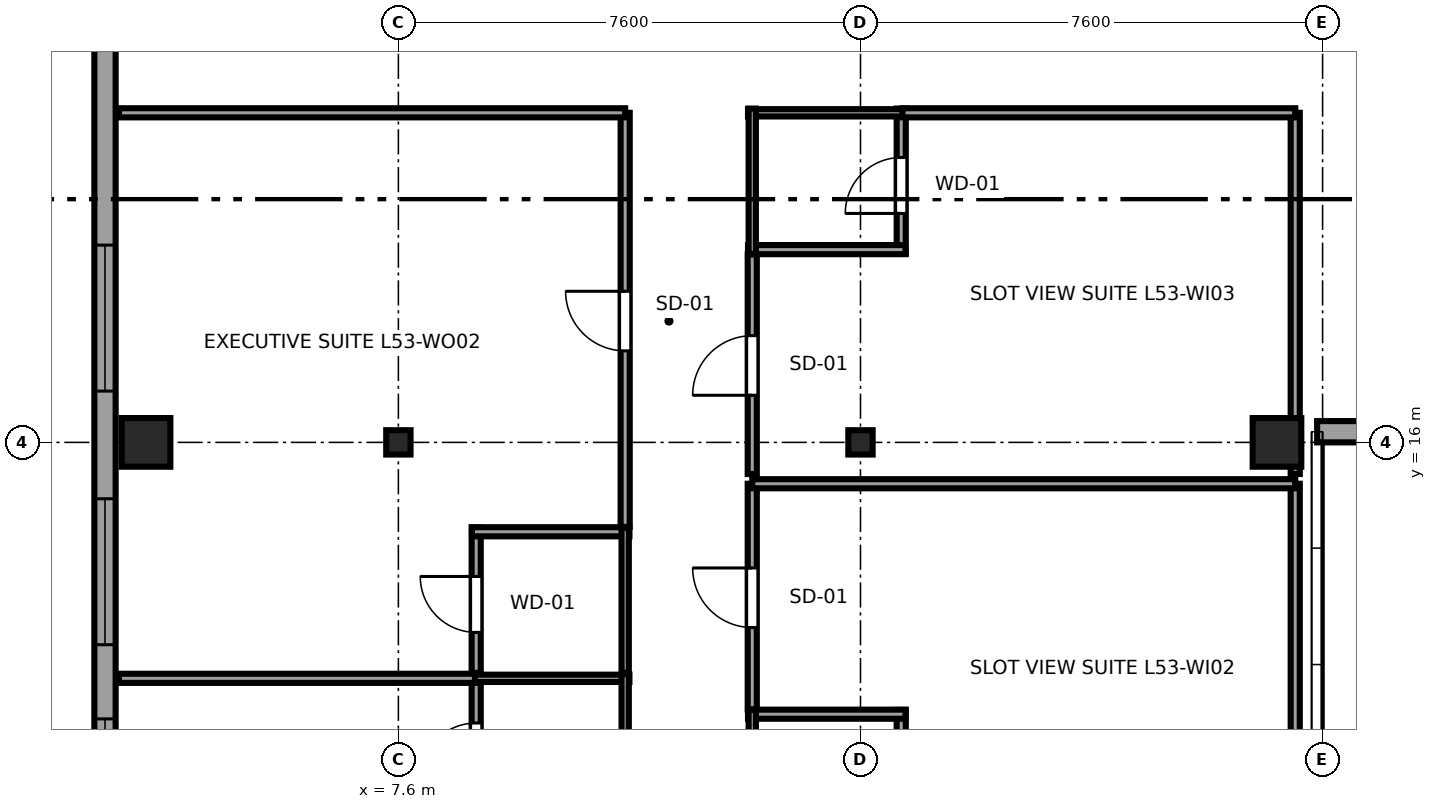
"""IFC4 building model, lengths in metres.
Left out: names, types, materials, properties, quantities, classifications, styles, units other than length and angle.
Written with IfcOpenShell. Run it as: python <this file> out.ifc"""

import sys

from ifc_helpers import new_model, si_unit, direction, frame, frame_2d, origin, origin_2d, place, context, subcontext, project, spatial, rectangle, i_section, extrude, source, transform, mapped, element, fill, save


model = new_model("IFC4")
c1 = context("Model", 3, precision=1e-05, world=origin(), true_north=direction((0.0, 1.0)))
c2 = subcontext(c1, "Body", "Model", "MODEL_VIEW")
j1 = project(units=[si_unit("LENGTHUNIT", "METRE"), si_unit("PLANEANGLEUNIT", "RADIAN")], contexts=[c1])
p1 = place(None, origin())
s1 = spatial("IfcSite", under=j1, at=p1, CompositionType="ELEMENT")
p2 = place(p1, origin())
s2 = spatial("IfcBuilding", under=s1, at=p2, CompositionType="ELEMENT")
p3 = place(p2, frame((0.0, 0.0, 201.75)))
s3 = spatial("IfcBuildingStorey", under=s2, at=p3, CompositionType="ELEMENT", Elevation=201.75)
m1 = source(origin(), c2, "Body", "SweptSolid", [
    extrude(rectangle(XDim=0.8, YDim=0.8, at=origin_2d()), origin(), (0.0, 0.0, 1.0), 3.55),
])
p4 = place(p3, frame((3.45, 16.0, 0.0), z_axis=(0.0, 0.0, 1.0), x_axis=(1.0, 0.0, 0.0)))
e1 = element("IfcColumn", 1, at=p4, inside=s3, PredefinedType="COLUMN", context=c2, shape_type="MappedRepresentation", body=[
    mapped(m1, transform((0.0, 0.0, 0.0), x_axis=(1.0, 0.0, 0.0), y_axis=(0.0, 1.0, 0.0), z_axis=(0.0, 0.0, 1.0), scale=1.0)),
])
m2 = source(origin(), c2, "Body", "SweptSolid", [
    extrude(i_section(OverallWidth=0.4, OverallDepth=0.4, WebThickness=0.02, FlangeThickness=0.035, at=origin_2d()), origin(), (0.0, 0.0, 1.0), 3.55),
])
for number, where, z_axis, x_axis in (
    (2, (7.6, 16.0, 0.0), (0.0, 0.0, 1.0), (1.0, 0.0, 0.0)),
    (3, (15.2, 16.0, 0.0), (0.0, 0.0, 1.0), (1.0, 0.0, 0.0)),
):
    element("IfcColumn", number, at=place(p3, frame(where, z_axis=z_axis, x_axis=x_axis)), inside=s3, PredefinedType="COLUMN", context=c2, shape_type="MappedRepresentation", body=[
        mapped(m2, transform((0.0, 0.0, 0.0), x_axis=(1.0, 0.0, 0.0), y_axis=(0.0, 1.0, 0.0), z_axis=(0.0, 0.0, 1.0), scale=1.0)),
    ])
p5 = place(p3, frame((22.05, 16.0, 0.0), z_axis=(0.0, 0.0, 1.0), x_axis=(1.0, 0.0, 0.0)))
e4 = element("IfcColumn", 4, at=p5, inside=s3, PredefinedType="COLUMN", context=c2, shape_type="MappedRepresentation", body=[
    mapped(m1, transform((0.0, 0.0, 0.0), x_axis=(1.0, 0.0, 0.0), y_axis=(0.0, 1.0, 0.0), z_axis=(0.0, 0.0, 1.0), scale=1.0)),
])
p6 = place(p3, frame((22.71, 16.175, 0.0), z_axis=(0.0, 0.0, 1.0), x_axis=(1.0, 0.0, 0.0)))
e5 = element("IfcWall", 5, at=p6, inside=s3, PredefinedType="SOLIDWALL", context=c2, shape_type="SweptSolid", body=[
    extrude(rectangle(XDim=11.58, YDim=0.35, at=frame_2d((5.79, 0.0))), origin(), (0.0, 0.0, 1.0), 2.08),
])
p7 = place(p3, frame((2.775, 41.583, 0.0), z_axis=(0.0, 0.0, 1.0), x_axis=(0.0, -1.0, 0.0)))
e6 = element("IfcWall", 6, at=p7, inside=s3, PredefinedType="SOLIDWALL", context=c2, shape_type="SweptSolid", body=[
    extrude(rectangle(XDim=34.566, YDim=0.35, at=frame_2d((17.283, 0.0))), origin(), (0.0, 0.0, 1.0), 3.29),
])
p8 = place(p7, frame((10.877, 0.0, 0.68)))
e7 = element("IfcOpeningElement", 7, at=p8, cuts=e6, PredefinedType="OPENING", context=c2, shape_type="SweptSolid", body=[
    extrude(rectangle(XDim=2.4, YDim=1.9, at=frame_2d((1.2, 0.95))), frame((0.0, 0.185, 0.0), z_axis=(0.0, -1.0, 0.0), x_axis=(1.0, 0.0, 0.0)), (0.0, 0.0, 1.0), 0.37),
])
p9 = place(p7, frame((13.997, 0.0, 0.68)))
e8 = element("IfcOpeningElement", 8, at=p9, cuts=e6, PredefinedType="OPENING", context=c2, shape_type="SweptSolid", body=[
    extrude(rectangle(XDim=2.4, YDim=1.9, at=frame_2d((1.2, 0.95))), frame((0.0, 0.185, 0.0), z_axis=(0.0, -1.0, 0.0), x_axis=(1.0, 0.0, 0.0)), (0.0, 0.0, 1.0), 0.37),
])
p10 = place(p7, frame((22.339, 0.0, 0.68)))
e9 = element("IfcOpeningElement", 9, at=p10, cuts=e6, PredefinedType="OPENING", context=c2, shape_type="SweptSolid", body=[
    extrude(rectangle(XDim=2.4, YDim=1.9, at=frame_2d((1.2, 0.95))), frame((0.0, 0.185, 0.0), z_axis=(0.0, -1.0, 0.0), x_axis=(1.0, 0.0, 0.0)), (0.0, 0.0, 1.0), 0.37),
])
p11 = place(p7, frame((26.51, 0.0, 0.68)))
e10 = element("IfcOpeningElement", 10, at=p11, cuts=e6, PredefinedType="OPENING", context=c2, shape_type="SweptSolid", body=[
    extrude(rectangle(XDim=2.4, YDim=1.9, at=frame_2d((1.2, 0.95))), frame((0.0, 0.185, 0.0), z_axis=(0.0, -1.0, 0.0), x_axis=(1.0, 0.0, 0.0)), (0.0, 0.0, 1.0), 0.37),
])
p12 = place(p7, frame((30.13, 0.0, 0.68)))
e11 = element("IfcOpeningElement", 11, at=p12, cuts=e6, PredefinedType="OPENING", context=c2, shape_type="SweptSolid", body=[
    extrude(rectangle(XDim=2.4, YDim=1.9, at=frame_2d((1.2, 0.95))), frame((0.0, 0.185, 0.0), z_axis=(0.0, -1.0, 0.0), x_axis=(1.0, 0.0, 0.0)), (0.0, 0.0, 1.0), 0.37),
])
p13 = place(p7, frame((6.033, 0.0, 0.62)))
e12 = element("IfcOpeningElement", 12, at=p13, cuts=e6, PredefinedType="OPENING", context=c2, shape_type="SweptSolid", body=[
    extrude(rectangle(XDim=1.5, YDim=1.55, at=frame_2d((0.75, 0.775))), frame((0.0, 0.185, 0.0), z_axis=(0.0, -1.0, 0.0), x_axis=(1.0, 0.0, 0.0)), (0.0, 0.0, 1.0), 0.37),
])
p14 = place(p3, frame((8.88, 9.8, 0.0), z_axis=(0.0, 0.0, 1.0), x_axis=(0.0, 1.0, 0.0)))
e13 = element("IfcWall", 13, at=p14, inside=s3, PredefinedType="PARTITIONING", context=c2, shape_type="SweptSolid", body=[
    extrude(rectangle(XDim=2.39, YDim=0.15, at=frame_2d((1.195, 0.0))), origin(), (0.0, 0.0, 1.0), 3.29),
])
p15 = place(p14, frame((0.665, 0.0, 0.0)))
e14 = element("IfcOpeningElement", 14, at=p15, cuts=e13, PredefinedType="OPENING", context=c2, shape_type="SweptSolid", body=[
    extrude(rectangle(XDim=0.92, YDim=2.01, at=frame_2d((0.46, 1.005))), frame((0.0, 0.085, 0.0), z_axis=(0.0, -1.0, 0.0), x_axis=(1.0, 0.0, 0.0)), (0.0, 0.0, 1.0), 0.17),
])
p16 = place(p3, frame((8.81, 12.12, 0.0), z_axis=(0.0, 0.0, 1.0), x_axis=(1.0, 0.0, 0.0)))
e15 = element("IfcWall", 15, at=p16, inside=s3, PredefinedType="PLUMBINGWALL", context=c2, shape_type="SweptSolid", body=[
    extrude(rectangle(XDim=2.59, YDim=0.12, at=frame_2d((1.295, 0.0))), origin(), (0.0, 0.0, 1.0), 3.29),
])
p17 = place(p3, frame((11.33, 9.8, 0.0), z_axis=(0.0, 0.0, 1.0), x_axis=(0.0, 1.0, 0.0)))
e16 = element("IfcWall", 16, at=p17, inside=s3, PredefinedType="PLUMBINGWALL", context=c2, shape_type="SweptSolid", body=[
    extrude(rectangle(XDim=2.39, YDim=0.12, at=frame_2d((1.195, 0.0))), origin(), (0.0, 0.0, 1.0), 2.921),
])
p18 = place(p3, frame((8.88, 12.21, 0.0), z_axis=(0.0, 0.0, 1.0), x_axis=(0.0, 1.0, 0.0)))
e17 = element("IfcWall", 17, at=p18, inside=s3, PredefinedType="PARTITIONING", context=c2, shape_type="SweptSolid", body=[
    extrude(rectangle(XDim=2.39, YDim=0.15, at=frame_2d((1.195, 0.0))), origin(), (0.0, 0.0, 1.0), 3.29),
])
p19 = place(p18, frame((0.665, 0.0, 0.0)))
e18 = element("IfcOpeningElement", 18, at=p19, cuts=e17, PredefinedType="OPENING", context=c2, shape_type="SweptSolid", body=[
    extrude(rectangle(XDim=0.92, YDim=2.01, at=frame_2d((0.46, 1.005))), frame((0.0, 0.085, 0.0), z_axis=(0.0, -1.0, 0.0), x_axis=(1.0, 0.0, 0.0)), (0.0, 0.0, 1.0), 0.17),
])
p20 = place(p3, frame((8.81, 14.53, 0.0), z_axis=(0.0, 0.0, 1.0), x_axis=(1.0, 0.0, 0.0)))
e19 = element("IfcWall", 19, at=p20, inside=s3, PredefinedType="PARTITIONING", context=c2, shape_type="SweptSolid", body=[
    extrude(rectangle(XDim=2.59, YDim=0.15, at=frame_2d((1.295, 0.0))), origin(), (0.0, 0.0, 1.0), 3.29),
])
p21 = place(p3, frame((11.33, 12.21, 0.0), z_axis=(0.0, 0.0, 1.0), x_axis=(0.0, 1.0, 0.0)))
e20 = element("IfcWall", 20, at=p21, inside=s3, PredefinedType="PLUMBINGWALL", context=c2, shape_type="SweptSolid", body=[
    extrude(rectangle(XDim=2.39, YDim=0.12, at=frame_2d((1.195, 0.0))), origin(), (0.0, 0.0, 1.0), 2.921),
])
p22 = place(p3, frame((15.87, 9.21, 0.0), z_axis=(0.0, 0.0, 1.0), x_axis=(0.0, 1.0, 0.0)))
e21 = element("IfcWall", 21, at=p22, inside=s3, PredefinedType="PARTITIONING", context=c2, shape_type="SweptSolid", body=[
    extrude(rectangle(XDim=2.39, YDim=0.15, at=frame_2d((1.195, 0.0))), origin(), (0.0, 0.0, 1.0), 3.29),
])
p23 = place(p22, frame((0.665, 0.0, 0.0)))
e22 = element("IfcOpeningElement", 22, at=p23, cuts=e21, PredefinedType="OPENING", context=c2, shape_type="SweptSolid", body=[
    extrude(rectangle(XDim=0.92, YDim=2.01, at=frame_2d((0.46, 1.005))), frame((0.0, 0.085, 0.0), z_axis=(0.0, -1.0, 0.0), x_axis=(1.0, 0.0, 0.0)), (0.0, 0.0, 1.0), 0.17),
])
p24 = place(p3, frame((13.35, 11.53, 0.0), z_axis=(0.0, 0.0, 1.0), x_axis=(1.0, 0.0, 0.0)))
e23 = element("IfcWall", 23, at=p24, inside=s3, PredefinedType="PARTITIONING", context=c2, shape_type="SweptSolid", body=[
    extrude(rectangle(XDim=2.59, YDim=0.15, at=frame_2d((1.295, 0.0))), origin(), (0.0, 0.0, 1.0), 3.29),
])
p25 = place(p3, frame((13.42, 9.21, 0.0), z_axis=(0.0, 0.0, 1.0), x_axis=(0.0, 1.0, 0.0)))
e24 = element("IfcWall", 24, at=p25, inside=s3, PredefinedType="PLUMBINGWALL", context=c2, shape_type="SweptSolid", body=[
    extrude(rectangle(XDim=2.39, YDim=0.12, at=frame_2d((1.195, 0.0))), origin(), (0.0, 0.0, 1.0), 3.29),
])
p26 = place(p3, frame((15.87, 19.1, 0.0), z_axis=(0.0, 0.0, 1.0), x_axis=(0.0, 1.0, 0.0)))
e25 = element("IfcWall", 25, at=p26, inside=s3, PredefinedType="PARTITIONING", context=c2, shape_type="SweptSolid", body=[
    extrude(rectangle(XDim=2.39, YDim=0.15, at=frame_2d((1.195, 0.0))), origin(), (0.0, 0.0, 1.0), 3.29),
])
p27 = place(p26, frame((0.665, 0.0, 0.0)))
e26 = element("IfcOpeningElement", 26, at=p27, cuts=e25, PredefinedType="OPENING", context=c2, shape_type="SweptSolid", body=[
    extrude(rectangle(XDim=0.92, YDim=2.01, at=frame_2d((0.46, 1.005))), frame((0.0, 0.085, 0.0), z_axis=(0.0, -1.0, 0.0), x_axis=(1.0, 0.0, 0.0)), (0.0, 0.0, 1.0), 0.17),
])
p28 = place(p3, frame((13.35, 19.17, 0.0), z_axis=(0.0, 0.0, 1.0), x_axis=(1.0, 0.0, 0.0)))
e27 = element("IfcWall", 27, at=p28, inside=s3, PredefinedType="PARTITIONING", context=c2, shape_type="SweptSolid", body=[
    extrude(rectangle(XDim=2.59, YDim=0.15, at=frame_2d((1.295, 0.0))), origin(), (0.0, 0.0, 1.0), 3.29),
])
p29 = place(p3, frame((13.35, 21.42, 0.0), z_axis=(0.0, 0.0, 1.0), x_axis=(1.0, 0.0, 0.0)))
e28 = element("IfcWall", 28, at=p29, inside=s3, PredefinedType="PLUMBINGWALL", context=c2, shape_type="SweptSolid", body=[
    extrude(rectangle(XDim=2.59, YDim=0.12, at=frame_2d((1.295, 0.0))), origin(), (0.0, 0.0, 1.0), 3.29),
])
p30 = place(p3, frame((13.42, 19.1, 0.0), z_axis=(0.0, 0.0, 1.0), x_axis=(0.0, 1.0, 0.0)))
e29 = element("IfcWall", 29, at=p30, inside=s3, PredefinedType="PLUMBINGWALL", context=c2, shape_type="SweptSolid", body=[
    extrude(rectangle(XDim=2.39, YDim=0.12, at=frame_2d((1.195, 0.0))), origin(), (0.0, 0.0, 1.0), 3.29),
])
p31 = place(p3, frame((3.005, 12.12, 0.0), z_axis=(0.0, 0.0, 1.0), x_axis=(1.0, 0.0, 0.0)))
e30 = element("IfcWall", 30, at=p31, inside=s3, PredefinedType="PARTITIONING", context=c2, shape_type="SweptSolid", body=[
    extrude(rectangle(XDim=5.855, YDim=0.15, at=frame_2d((2.928, 0.0))), origin(), (0.0, 0.0, 1.0), 3.29),
])
p32 = place(p3, frame((11.33, 14.61, 0.0), z_axis=(0.0, 0.0, 1.0), x_axis=(0.0, 1.0, 0.0)))
e31 = element("IfcWall", 31, at=p32, inside=s3, PredefinedType="PARTITIONING", context=c2, shape_type="SweptSolid", body=[
    extrude(rectangle(XDim=6.81, YDim=0.15, at=frame_2d((3.405, 0.0))), origin(), (0.0, 0.0, 1.0), 2.921),
])
p33 = place(p32, frame((2.895, 0.0, 0.0)))
e32 = element("IfcOpeningElement", 32, at=p33, cuts=e31, PredefinedType="OPENING", context=c2, shape_type="SweptSolid", body=[
    extrude(rectangle(XDim=0.98, YDim=2.12, at=frame_2d((0.49, 1.06))), frame((0.0, 0.085, 0.0), z_axis=(0.0, -1.0, 0.0), x_axis=(1.0, 0.0, 0.0)), (0.0, 0.0, 1.0), 0.17),
])
p34 = place(p3, frame((3.005, 21.42, 0.0), z_axis=(0.0, 0.0, 1.0), x_axis=(1.0, 0.0, 0.0)))
e33 = element("IfcWall", 33, at=p34, inside=s3, PredefinedType="PARTITIONING", context=c2, shape_type="SweptSolid", body=[
    extrude(rectangle(XDim=8.325, YDim=0.15, at=frame_2d((4.163, 0.0))), origin(), (0.0, 0.0, 1.0), 3.29),
])
p35 = place(p3, frame((13.42, 11.61, 0.0), z_axis=(0.0, 0.0, 1.0), x_axis=(0.0, 1.0, 0.0)))
e34 = element("IfcWall", 34, at=p35, inside=s3, PredefinedType="PARTITIONING", context=c2, shape_type="SweptSolid", body=[
    extrude(rectangle(XDim=3.71, YDim=0.15, at=frame_2d((1.855, 0.0))), origin(), (0.0, 0.0, 1.0), 3.29),
])
p36 = place(p35, frame((1.345, 0.0, 0.0)))
e35 = element("IfcOpeningElement", 35, at=p36, cuts=e34, PredefinedType="OPENING", context=c2, shape_type="SweptSolid", body=[
    extrude(rectangle(XDim=0.98, YDim=2.12, at=frame_2d((0.49, 1.06))), frame((0.0, 0.085, 0.0), z_axis=(0.0, -1.0, 0.0), x_axis=(1.0, 0.0, 0.0)), (0.0, 0.0, 1.0), 0.17),
])
p37 = place(p3, frame((22.35, 9.28, 0.0), z_axis=(0.0, 0.0, 1.0), x_axis=(0.0, 1.0, 0.0)))
e36 = element("IfcWall", 36, at=p37, inside=s3, PredefinedType="PARTITIONING", context=c2, shape_type="SweptSolid", body=[
    extrude(rectangle(XDim=6.04, YDim=0.15, at=frame_2d((3.02, 0.0))), origin(), (0.0, 0.0, 1.0), 2.08),
])
p38 = place(p3, frame((13.42, 15.32, 0.0), z_axis=(0.0, 0.0, 1.0), x_axis=(1.0, 0.0, 0.0)))
e37 = element("IfcWall", 37, at=p38, inside=s3, PredefinedType="PARTITIONING", context=c2, shape_type="SweptSolid", body=[
    extrude(rectangle(XDim=8.93, YDim=0.15, at=frame_2d((4.465, 0.0))), origin(), (0.0, 0.0, 1.0), 3.29),
])
p39 = place(p3, frame((13.42, 15.48, 0.0), z_axis=(0.0, 0.0, 1.0), x_axis=(0.0, 1.0, 0.0)))
e38 = element("IfcWall", 38, at=p39, inside=s3, PredefinedType="PARTITIONING", context=c2, shape_type="SweptSolid", body=[
    extrude(rectangle(XDim=3.61, YDim=0.15, at=frame_2d((1.805, 0.0))), origin(), (0.0, 0.0, 1.0), 3.29),
])
p40 = place(p39, frame((1.295, 0.0, 0.0)))
e39 = element("IfcOpeningElement", 39, at=p40, cuts=e38, PredefinedType="OPENING", context=c2, shape_type="SweptSolid", body=[
    extrude(rectangle(XDim=0.98, YDim=2.12, at=frame_2d((0.49, 1.06))), frame((0.0, 0.085, 0.0), z_axis=(0.0, -1.0, 0.0), x_axis=(1.0, 0.0, 0.0)), (0.0, 0.0, 1.0), 0.17),
])
p41 = place(p3, frame((22.35, 15.48, 0.0), z_axis=(0.0, 0.0, 1.0), x_axis=(0.0, 1.0, 0.0)))
e40 = element("IfcWall", 40, at=p41, inside=s3, PredefinedType="PARTITIONING", context=c2, shape_type="SweptSolid", body=[
    extrude(rectangle(XDim=5.94, YDim=0.15, at=frame_2d((2.97, 0.0))), origin(), (0.0, 0.0, 1.0), 2.08),
])
p42 = place(p3, frame((15.89, 21.42, 0.0), z_axis=(0.0, 0.0, 1.0), x_axis=(1.0, 0.0, 0.0)))
e41 = element("IfcWall", 41, at=p42, inside=s3, PredefinedType="PARTITIONING", context=c2, shape_type="SweptSolid", body=[
    extrude(rectangle(XDim=6.46, YDim=0.15, at=frame_2d((3.23, 0.0))), origin(), (0.0, 0.0, 1.0), 3.29),
])
m3 = source(origin(), c2, "Body", "SweptSolid", [
    extrude(rectangle(XDim=2.4, YDim=1.9, at=frame_2d((1.2, 0.95))), frame((0.0, 0.09, 0.0), z_axis=(0.0, -1.0, 0.0), x_axis=(1.0, 0.0, 0.0)), (0.0, 0.0, 1.0), 0.06),
])
p43 = place(p10, origin())
e42 = element("IfcWindow", 42, at=p43, inside=s3, PartitioningType="TRIPLE_PANEL_HORIZONTAL", PredefinedType="WINDOW", context=c2, shape_type="MappedRepresentation", body=[
    mapped(m3, transform((0.0, 0.0, 0.0), x_axis=(1.0, 0.0, 0.0), y_axis=(0.0, 1.0, 0.0), z_axis=(0.0, 0.0, 1.0), scale=1.0)),
])
fill(e9, e42)
p44 = place(p11, origin())
e43 = element("IfcWindow", 43, at=p44, inside=s3, PartitioningType="TRIPLE_PANEL_HORIZONTAL", PredefinedType="WINDOW", context=c2, shape_type="MappedRepresentation", body=[
    mapped(m3, transform((0.0, 0.0, 0.0), x_axis=(1.0, 0.0, 0.0), y_axis=(0.0, 1.0, 0.0), z_axis=(0.0, 0.0, 1.0), scale=1.0)),
])
fill(e10, e43)
p45 = place(p12, origin())
e44 = element("IfcWindow", 44, at=p45, inside=s3, PartitioningType="TRIPLE_PANEL_HORIZONTAL", PredefinedType="WINDOW", context=c2, shape_type="MappedRepresentation", body=[
    mapped(m3, transform((0.0, 0.0, 0.0), x_axis=(1.0, 0.0, 0.0), y_axis=(0.0, 1.0, 0.0), z_axis=(0.0, 0.0, 1.0), scale=1.0)),
])
fill(e11, e44)
m4 = source(origin(), c2, "Body", "SweptSolid", [
    extrude(rectangle(XDim=0.92, YDim=2.01, at=frame_2d((0.46, 1.005))), frame((0.0, 0.025, 0.0), z_axis=(0.0, -1.0, 0.0), x_axis=(1.0, 0.0, 0.0)), (0.0, 0.0, 1.0), 0.05),
])
p46 = place(p15, origin())
e45 = element("IfcDoor", 45, at=p46, inside=s3, OperationType="SINGLE_SWING_LEFT", PredefinedType="DOOR", context=c2, shape_type="MappedRepresentation", body=[
    mapped(m4, transform((0.0, 0.0, 0.0), x_axis=(1.0, 0.0, 0.0), y_axis=(0.0, 1.0, 0.0), z_axis=(0.0, 0.0, 1.0), scale=1.0)),
])
fill(e14, e45)
p47 = place(p19, origin())
e46 = element("IfcDoor", 46, at=p47, inside=s3, OperationType="SINGLE_SWING_RIGHT", PredefinedType="DOOR", context=c2, shape_type="MappedRepresentation", body=[
    mapped(m4, transform((0.0, 0.0, 0.0), x_axis=(1.0, 0.0, 0.0), y_axis=(0.0, 1.0, 0.0), z_axis=(0.0, 0.0, 1.0), scale=1.0)),
])
fill(e18, e46)
p48 = place(p27, origin())
e47 = element("IfcDoor", 47, at=p48, inside=s3, OperationType="SINGLE_SWING_LEFT", PredefinedType="DOOR", context=c2, shape_type="MappedRepresentation", body=[
    mapped(m4, transform((0.0, 0.0, 0.0), x_axis=(1.0, 0.0, 0.0), y_axis=(0.0, 1.0, 0.0), z_axis=(0.0, 0.0, 1.0), scale=1.0)),
])
fill(e26, e47)
m5 = source(origin(), c2, "Body", "SweptSolid", [
    extrude(rectangle(XDim=0.98, YDim=2.12, at=frame_2d((0.49, 1.06))), frame((0.0, 0.025, 0.0), z_axis=(0.0, -1.0, 0.0), x_axis=(1.0, 0.0, 0.0)), (0.0, 0.0, 1.0), 0.05),
])
p49 = place(p33, origin())
e48 = element("IfcDoor", 48, at=p49, inside=s3, OperationType="SINGLE_SWING_RIGHT", PredefinedType="DOOR", context=c2, shape_type="MappedRepresentation", body=[
    mapped(m5, transform((0.0, 0.0, 0.0), x_axis=(1.0, 0.0, 0.0), y_axis=(0.0, 1.0, 0.0), z_axis=(0.0, 0.0, 1.0), scale=1.0)),
])
fill(e32, e48)
p50 = place(p36, origin())
e49 = element("IfcDoor", 49, at=p50, inside=s3, OperationType="SINGLE_SWING_RIGHT", PredefinedType="DOOR", context=c2, shape_type="MappedRepresentation", body=[
    mapped(m5, transform((0.0, 0.0, 0.0), x_axis=(1.0, 0.0, 0.0), y_axis=(0.0, 1.0, 0.0), z_axis=(0.0, 0.0, 1.0), scale=1.0)),
])
fill(e35, e49)
p51 = place(p40, origin())
e50 = element("IfcDoor", 50, at=p51, inside=s3, OperationType="SINGLE_SWING_LEFT", PredefinedType="DOOR", context=c2, shape_type="MappedRepresentation", body=[
    mapped(m5, transform((0.0, 0.0, 0.0), x_axis=(1.0, 0.0, 0.0), y_axis=(0.0, 1.0, 0.0), z_axis=(0.0, 0.0, 1.0), scale=1.0)),
])
fill(e39, e50)
save(model, sys.argv[1])
